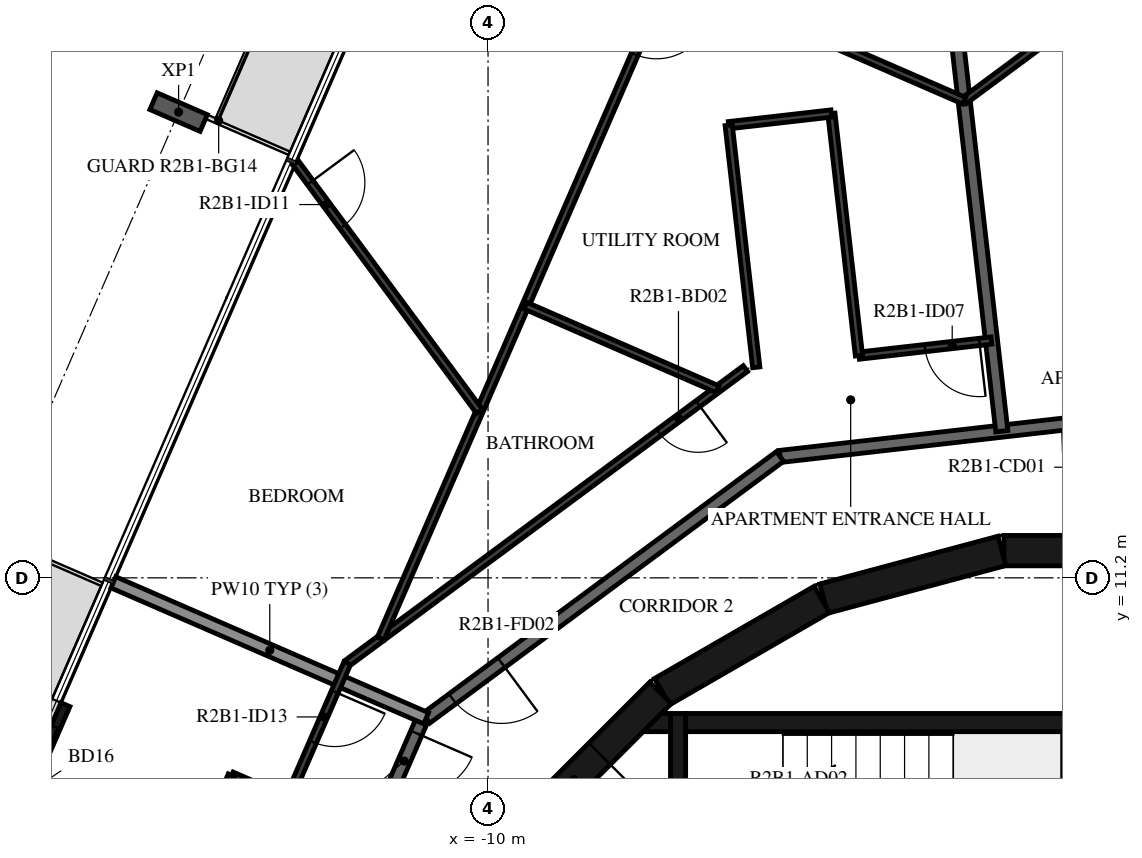
"""IFC4 building model, lengths in metres.
Left out: names, types, materials, properties, quantities, classifications, styles, units other than length and angle.
Written with IfcOpenShell. Run it as: python <this file> out.ifc"""

import sys

from ifc_helpers import new_model, si_unit, direction, frame, frame_2d, origin, origin_2d, place, context, subcontext, project, spatial, polyline, rectangle, i_section, outline, extrude, element, fill, save


model = new_model("IFC4")
c1 = context("Model", 3, precision=1e-05, world=origin(), true_north=direction((0.0, 1.0)))
c2 = subcontext(c1, "Body", "Model", "MODEL_VIEW")
j1 = project(units=[si_unit("LENGTHUNIT", "METRE"), si_unit("PLANEANGLEUNIT", "RADIAN")], contexts=[c1])
p1 = place(None, origin())
s1 = spatial("IfcSite", under=j1, at=p1, CompositionType="ELEMENT")
p2 = place(p1, origin())
s2 = spatial("IfcBuilding", under=s1, at=p2, CompositionType="ELEMENT")
p3 = place(p2, frame((0.0, 0.0, 87.2)))
s3 = spatial("IfcBuildingStorey", under=s2, at=p3, CompositionType="ELEMENT", Elevation=87.2)
p4 = place(p3, frame((-15.089, 18.859, -0.38), z_axis=(0.0, 0.0, 1.0), x_axis=(0.398749038162, 0.917060087761, 0.0)))
e1 = element("IfcColumn", 1, at=p4, inside=s3, PredefinedType="COLUMN", context=c2, shape_type="SweptSolid", body=[
    extrude(i_section(OverallWidth=0.3, OverallDepth=0.9, WebThickness=0.019, FlangeThickness=0.035, FilletRadius=0.03, at=origin_2d()), origin(), (0.0, 0.0, 1.0), 3.5),
])
p5 = place(p3, frame((-16.949, 9.114, 0.0), z_axis=(0.0, 0.0, 1.0), x_axis=(-0.398720531764, -0.917072482168, 0.0)))
e2 = element("IfcWall", 2, at=p5, inside=s3, PredefinedType="STANDARD", context=c2, shape_type="SweptSolid", body=[
    extrude(rectangle(XDim=3.2, YDim=0.16, at=frame_2d((1.6, 0.0))), origin(), (0.0, 0.0, 1.0), 3.12),
])
p6 = place(p5, frame((0.4, 0.0, 0.0)))
e3 = element("IfcOpeningElement", 3, at=p6, cuts=e2, PredefinedType="OPENING", context=c2, shape_type="SweptSolid", body=[
    extrude(rectangle(XDim=2.4, YDim=2.4, at=frame_2d((1.2, 1.2))), frame((0.0, 0.09, 0.0), z_axis=(0.0, -1.0, 0.0), x_axis=(1.0, 0.0, 0.0)), (0.0, 0.0, 1.0), 0.18),
])
for number, where, z_axis, x_axis in (
    (4, (1.516, 11.647, 0.0), (0.0, 0.0, 1.0), (-1.0, 0.0, 0.0)),
    (5, (-1.55, 11.643, 0.0), (0.0, 0.0, 1.0), (-0.966, -0.259, 0.0)),
    (6, (-4.51, 10.845, 0.0), (0.0, 0.0, 1.0), (-0.866, -0.5, 0.0)),
):
    element("IfcWall", number, at=place(p3, frame(where, z_axis=z_axis, x_axis=x_axis)), inside=s3, PredefinedType="SHEAR", context=c2, shape_type="SweptSolid", body=[
        extrude(rectangle(XDim=3.033, YDim=0.5, at=frame_2d((1.516, 0.0))), origin(), (0.0, 0.0, 1.0), 3.12),
    ])
p7 = place(p3, frame((-7.164, 9.308, 0.0), z_axis=(0.0, 0.0, 1.0), x_axis=(-0.707106781187, -0.707106781187, 0.0)))
e7 = element("IfcWall", 7, at=p7, inside=s3, PredefinedType="SHEAR", context=c2, shape_type="SweptSolid", body=[
    extrude(rectangle(XDim=3.032, YDim=0.5, at=frame_2d((1.516, 0.0))), origin(), (0.0, 0.0, 1.0), 3.12),
])
p8 = place(p7, frame((1.416, 0.0, 0.0)))
e8 = element("IfcOpeningElement", 8, at=p8, cuts=e7, PredefinedType="OPENING", context=c2, shape_type="SweptSolid", body=[
    extrude(rectangle(XDim=1.2, YDim=2.1, at=frame_2d((0.6, 1.05))), frame((0.0, 0.26, 0.0), z_axis=(0.0, -1.0, 0.0), x_axis=(1.0, 0.0, 0.0)), (0.0, 0.0, 1.0), 0.52),
])
p9 = place(p3, frame((-6.75, 8.82, 0.0), z_axis=(0.0, 0.0, 1.0), x_axis=(1.0, 0.0, 0.0)))
e9 = element("IfcWall", 9, at=p9, inside=s3, PredefinedType="SHEAR", context=c2, shape_type="SweptSolid", body=[
    extrude(rectangle(XDim=6.75, YDim=0.3, at=frame_2d((3.375, 0.0))), origin(), (0.0, 0.0, 1.0), 3.12),
])
p10 = place(p3, frame((-6.875, 8.97, 0.0), z_axis=(0.0, 0.0, 1.0), x_axis=(0.0, -1.0, 0.0)))
e10 = element("IfcWall", 10, at=p10, inside=s3, PredefinedType="SHEAR", context=c2, shape_type="SweptSolid", body=[
    extrude(rectangle(XDim=3.92, YDim=0.25, at=frame_2d((1.96, 0.0))), origin(), (0.0, 0.0, 1.0), 3.12),
])
p11 = place(p10, frame((1.61, 0.0, 0.0)))
e11 = element("IfcOpeningElement", 11, at=p11, cuts=e10, PredefinedType="OPENING", context=c2, shape_type="SweptSolid", body=[
    extrude(rectangle(XDim=1.2, YDim=2.1, at=frame_2d((0.6, 1.05))), frame((0.0, 0.135, 0.0), z_axis=(0.0, -1.0, 0.0), x_axis=(1.0, 0.0, 0.0)), (0.0, 0.0, 1.0), 0.27),
])
p12 = place(p3, origin())
e12 = element("IfcWall", 12, at=p12, inside=s3, PredefinedType="SHEAR", context=c2, shape_type="SweptSolid", body=[
    extrude(outline(polyline([(-7.148, 8.97), (-7.0, 8.97), (-7.0, 8.67), (-7.448, 8.67), (-7.148, 8.97)])), origin(), (0.0, 0.0, 1.0), 3.12),
])
p13 = place(p3, frame((2.096, 14.028, 0.0), z_axis=(0.0, 0.0, 1.0), x_axis=(-0.993569170114, -0.113226782163, 0.0)))
e13 = element("IfcWall", 13, at=p13, inside=s3, PredefinedType="STANDARD", context=c2, shape_type="SweptSolid", body=[
    extrude(rectangle(XDim=7.342, YDim=0.2, at=frame_2d((3.671, 0.0))), origin(), (0.0, 0.0, 1.0), 3.12),
])
p14 = place(p3, frame((-5.198, 13.196, 0.0), z_axis=(0.0, 0.0, 1.0), x_axis=(-0.803864151363, -0.594812933748, 0.0)))
e14 = element("IfcWall", 14, at=p14, inside=s3, PredefinedType="STANDARD", context=c2, shape_type="SweptSolid", body=[
    extrude(rectangle(XDim=7.24, YDim=0.2, at=frame_2d((3.62, 0.0))), origin(), (0.0, 0.0, 1.0), 3.12),
])
p15 = place(p14, frame((5.7, 0.0, 0.0)))
e15 = element("IfcOpeningElement", 15, at=p15, cuts=e14, PredefinedType="OPENING", context=c2, shape_type="SweptSolid", body=[
    extrude(rectangle(XDim=1.0, YDim=2.1, at=frame_2d((0.5, 1.05))), frame((0.0, 0.11, 0.0), z_axis=(0.0, -1.0, 0.0), x_axis=(1.0, 0.0, 0.0)), (0.0, 0.0, 1.0), 0.22),
])
p16 = place(p3, frame((-11.1, 8.829, 0.0), z_axis=(0.0, 0.0, 1.0), x_axis=(-0.398741918631, -0.917063183388, 0.0)))
e16 = element("IfcWall", 16, at=p16, inside=s3, PredefinedType="STANDARD", context=c2, shape_type="SweptSolid", body=[
    extrude(rectangle(XDim=7.342, YDim=0.2, at=frame_2d((3.671, 0.0))), origin(), (0.0, 0.0, 1.0), 3.12),
])
p17 = place(p16, frame((0.2, 0.0, 0.0)))
e17 = element("IfcOpeningElement", 17, at=p17, cuts=e16, PredefinedType="OPENING", context=c2, shape_type="SweptSolid", body=[
    extrude(rectangle(XDim=1.0, YDim=2.1, at=frame_2d((0.5, 1.05))), frame((0.0, 0.11, 0.0), z_axis=(0.0, -1.0, 0.0), x_axis=(1.0, 0.0, 0.0)), (0.0, 0.0, 1.0), 0.22),
])
p18 = place(p3, frame((-2.384, 20.92, 0.0), z_axis=(0.0, 0.0, 1.0), x_axis=(0.113210540889, -0.993571020829, 0.0)))
e18 = element("IfcWall", 18, at=p18, inside=s3, PredefinedType="STANDARD", context=c2, shape_type="SweptSolid", body=[
    extrude(rectangle(XDim=7.356, YDim=0.2, at=frame_2d((3.678, 0.0))), origin(), (0.0, 0.0, 1.0), 3.12),
])
p19 = place(p3, frame((-16.161, 11.126, 0.0), z_axis=(0.0, 0.0, 1.0), x_axis=(0.917063135481, -0.398742028813, 0.0)))
e19 = element("IfcWall", 19, at=p19, inside=s3, PredefinedType="STANDARD", context=c2, shape_type="SweptSolid", body=[
    extrude(rectangle(XDim=5.608, YDim=0.2, at=frame_2d((2.804, 0.0))), origin(), (0.0, 0.0, 1.0), 2.73),
])
p20 = place(p3, frame((2.068, 22.183, 0.0), z_axis=(0.0, 0.0, 1.0), x_axis=(-0.803867138365, -0.594808896921, 0.0)))
e20 = element("IfcWall", 20, at=p20, inside=s3, PredefinedType="PARTITIONING", context=c2, shape_type="SweptSolid", body=[
    extrude(rectangle(XDim=5.273, YDim=0.12, at=frame_2d((2.636, 0.0))), origin(), (0.0, 0.0, 1.0), 3.12),
])
p21 = place(p20, frame((0.2, 0.0, 0.0)))
e21 = element("IfcOpeningElement", 21, at=p21, cuts=e20, PredefinedType="OPENING", context=c2, shape_type="SweptSolid", body=[
    extrude(rectangle(XDim=0.9, YDim=2.1, at=frame_2d((0.45, 1.05))), frame((0.0, 0.07, 0.0), z_axis=(0.0, -1.0, 0.0), x_axis=(1.0, 0.0, 0.0)), (0.0, 0.0, 1.0), 0.14),
])
p22 = place(p3, frame((-1.721, 15.102, 0.0), z_axis=(0.0, 0.0, 1.0), x_axis=(-0.993571720958, -0.11320439617, 0.0)))
e22 = element("IfcWall", 22, at=p22, inside=s3, PredefinedType="PARTITIONING", context=c2, shape_type="SweptSolid", body=[
    extrude(rectangle(XDim=2.193, YDim=0.12, at=frame_2d((1.097, 0.0))), origin(), (0.0, 0.0, 1.0), 3.12),
])
p23 = place(p22, frame((0.2, 0.0, 0.0)))
e23 = element("IfcOpeningElement", 23, at=p23, cuts=e22, PredefinedType="OPENING", context=c2, shape_type="SweptSolid", body=[
    extrude(rectangle(XDim=0.9, YDim=2.1, at=frame_2d((0.45, 1.05))), frame((0.0, 0.07, 0.0), z_axis=(0.0, -1.0, 0.0), x_axis=(1.0, 0.0, 0.0)), (0.0, 0.0, 1.0), 0.14),
])
p24 = place(p3, frame((-3.9, 14.854, 0.0), z_axis=(0.0, 0.0, 1.0), x_axis=(-0.113178937308, 0.993574621329, 0.0)))
e24 = element("IfcWall", 24, at=p24, inside=s3, PredefinedType="PARTITIONING", context=c2, shape_type="SweptSolid", body=[
    extrude(rectangle(XDim=4.008, YDim=0.12, at=frame_2d((2.004, 0.0))), origin(), (0.0, 0.0, 1.0), 3.12),
])
p25 = place(p3, frame((-4.354, 18.836, 0.0), z_axis=(0.0, 0.0, 1.0), x_axis=(-0.99355903199, -0.113315709199, 0.0)))
e25 = element("IfcWall", 25, at=p25, inside=s3, PredefinedType="PARTITIONING", context=c2, shape_type="SweptSolid", body=[
    extrude(rectangle(XDim=1.7, YDim=0.12, at=frame_2d((0.85, 0.0))), origin(), (0.0, 0.0, 1.0), 3.12),
])
p26 = place(p3, frame((-6.042, 18.644, 0.0), z_axis=(0.0, 0.0, 1.0), x_axis=(0.113185787648, -0.993573840977, 0.0)))
e26 = element("IfcWall", 26, at=p26, inside=s3, PredefinedType="PARTITIONING", context=c2, shape_type="SweptSolid", body=[
    extrude(rectangle(XDim=4.008, YDim=0.12, at=frame_2d((2.004, 0.0))), origin(), (0.0, 0.0, 1.0), 3.12),
])
p27 = place(p3, frame((-5.767, 14.641, 0.0), z_axis=(0.0, 0.0, 1.0), x_axis=(-0.803853364238, -0.594827511807, 0.0)))
e27 = element("IfcWall", 27, at=p27, inside=s3, PredefinedType="PARTITIONING", context=c2, shape_type="SweptSolid", body=[
    extrude(rectangle(XDim=8.146, YDim=0.12, at=frame_2d((4.073, 0.0))), origin(), (0.0, 0.0, 1.0), 3.12),
])
p28 = place(p27, frame((0.97, 0.0, 0.0)))
e28 = element("IfcOpeningElement", 28, at=p28, cuts=e27, PredefinedType="OPENING", context=c2, shape_type="SweptSolid", body=[
    extrude(rectangle(XDim=0.8, YDim=2.1, at=frame_2d((0.4, 1.05))), frame((0.0, 0.07, 0.0), z_axis=(0.0, -1.0, 0.0), x_axis=(1.0, 0.0, 0.0)), (0.0, 0.0, 1.0), 0.14),
])
p29 = place(p3, frame((-12.315, 9.796, 0.0), z_axis=(0.0, 0.0, 1.0), x_axis=(-0.398762563957, -0.91705420646, 0.0)))
e29 = element("IfcWall", 29, at=p29, inside=s3, PredefinedType="PARTITIONING", context=c2, shape_type="SweptSolid", body=[
    extrude(rectangle(XDim=2.449, YDim=0.12, at=frame_2d((1.225, 0.0))), origin(), (0.0, 0.0, 1.0), 3.12),
])
p30 = place(p29, frame((0.513, 0.0, 0.0)))
e30 = element("IfcOpeningElement", 30, at=p30, cuts=e29, PredefinedType="OPENING", context=c2, shape_type="SweptSolid", body=[
    extrude(rectangle(XDim=0.9, YDim=2.1, at=frame_2d((0.45, 1.05))), frame((0.0, 0.07, 0.0), z_axis=(0.0, -1.0, 0.0), x_axis=(1.0, 0.0, 0.0)), (0.0, 0.0, 1.0), 0.14),
])
p31 = place(p3, frame((-7.005, 21.149, 0.0), z_axis=(0.0, 0.0, 1.0), x_axis=(0.917050915224, -0.398770132891, 0.0)))
e31 = element("IfcWall", 31, at=p31, inside=s3, PredefinedType="PARTITIONING", context=c2, shape_type="SweptSolid", body=[
    extrude(rectangle(XDim=5.272, YDim=0.12, at=frame_2d((2.636, 0.0))), origin(), (0.0, 0.0, 1.0), 3.12),
])
p32 = place(p31, frame((0.2, 0.0, 0.0)))
e32 = element("IfcOpeningElement", 32, at=p32, cuts=e31, PredefinedType="OPENING", context=c2, shape_type="SweptSolid", body=[
    extrude(rectangle(XDim=0.9, YDim=2.1, at=frame_2d((0.45, 1.05))), frame((0.0, 0.07, 0.0), z_axis=(0.0, -1.0, 0.0), x_axis=(1.0, 0.0, 0.0)), (0.0, 0.0, 1.0), 0.14),
])
p33 = place(p3, frame((-5.952, 23.571, 0.0), z_axis=(0.0, 0.0, 1.0), x_axis=(-0.398745097158, -0.917061801348, 0.0)))
e33 = element("IfcWall", 33, at=p33, inside=s3, PredefinedType="PARTITIONING", context=c2, shape_type="SweptSolid", body=[
    extrude(rectangle(XDim=14.576, YDim=0.12, at=frame_2d((7.288, 0.0))), origin(), (0.0, 0.0, 1.0), 3.12),
])
p34 = place(p33, frame((3.201, 0.0, 0.0)))
e34 = element("IfcOpeningElement", 34, at=p34, cuts=e33, PredefinedType="OPENING", context=c2, shape_type="SweptSolid", body=[
    extrude(rectangle(XDim=0.9, YDim=2.1, at=frame_2d((0.45, 1.05))), frame((0.0, 0.07, 0.0), z_axis=(0.0, -1.0, 0.0), x_axis=(1.0, 0.0, 0.0)), (0.0, 0.0, 1.0), 0.14),
])
p35 = place(p33, frame((0.2, 0.0, 0.0)))
e35 = element("IfcOpeningElement", 35, at=p35, cuts=e33, PredefinedType="OPENING", context=c2, shape_type="SweptSolid", body=[
    extrude(rectangle(XDim=0.9, YDim=2.1, at=frame_2d((0.45, 1.05))), frame((0.0, 0.07, 0.0), z_axis=(0.0, -1.0, 0.0), x_axis=(1.0, 0.0, 0.0)), (0.0, 0.0, 1.0), 0.14),
])
p36 = place(p3, frame((-9.385, 15.676, 0.0), z_axis=(0.0, 0.0, 1.0), x_axis=(0.917068929701, -0.398728702475, 0.0)))
e36 = element("IfcWall", 36, at=p36, inside=s3, PredefinedType="PARTITIONING", context=c2, shape_type="SweptSolid", body=[
    extrude(rectangle(XDim=3.445, YDim=0.12, at=frame_2d((1.723, 0.0))), origin(), (0.0, 0.0, 1.0), 3.12),
])
p37 = place(p3, frame((-13.163, 18.022, 0.0), z_axis=(0.0, 0.0, 1.0), x_axis=(0.594797671626, -0.803875444226, 0.0)))
e37 = element("IfcWall", 37, at=p37, inside=s3, PredefinedType="PARTITIONING", context=c2, shape_type="SweptSolid", body=[
    extrude(rectangle(XDim=5.081, YDim=0.12, at=frame_2d((2.54, 0.0))), origin(), (0.0, 0.0, 1.0), 3.12),
])
p38 = place(p37, frame((0.4, 0.0, 0.0)))
e38 = element("IfcOpeningElement", 38, at=p38, cuts=e37, PredefinedType="OPENING", context=c2, shape_type="SweptSolid", body=[
    extrude(rectangle(XDim=0.9, YDim=2.1, at=frame_2d((0.45, 1.05))), frame((0.0, 0.07, 0.0), z_axis=(0.0, -1.0, 0.0), x_axis=(1.0, 0.0, 0.0)), (0.0, 0.0, 1.0), 0.14),
])
p39 = place(p3, frame((-13.292, 7.55, 0.0), z_axis=(0.0, 0.0, 1.0), x_axis=(-0.917016180017, 0.398850003871, 0.0)))
e39 = element("IfcWall", 39, at=p39, inside=s3, PredefinedType="PARTITIONING", context=c2, shape_type="SweptSolid", body=[
    extrude(rectangle(XDim=1.009, YDim=0.12, at=frame_2d((0.504, 0.0))), origin(), (0.0, 0.0, 1.0), 3.12),
])
p40 = place(p3, frame((-14.217, 7.952, 0.0), z_axis=(0.0, 0.0, 1.0), x_axis=(-0.398722053614, -0.917071820503, 0.0)))
e40 = element("IfcWall", 40, at=p40, inside=s3, PredefinedType="PARTITIONING", context=c2, shape_type="SweptSolid", body=[
    extrude(rectangle(XDim=4.4, YDim=0.12, at=frame_2d((2.2, 0.0))), origin(), (0.0, 0.0, 1.0), 3.12),
])
p41 = place(p6, origin())
e41 = element("IfcDoor", 41, at=p41, inside=s3, OperationType="DOUBLE_DOOR_SLIDING", PredefinedType="DOOR", context=c2, shape_type="SweptSolid", body=[
    extrude(rectangle(XDim=2.4, YDim=2.4, at=frame_2d((1.2, 1.2))), frame((0.0, 0.025, 0.0), z_axis=(0.0, -1.0, 0.0), x_axis=(1.0, 0.0, 0.0)), (0.0, 0.0, 1.0), 0.05),
])
fill(e3, e41)
p42 = place(p8, origin())
e42 = element("IfcDoor", 42, at=p42, inside=s3, OperationType="SINGLE_SWING_RIGHT", PredefinedType="DOOR", context=c2, shape_type="SweptSolid", body=[
    extrude(rectangle(XDim=1.2, YDim=2.1, at=frame_2d((0.6, 1.05))), frame((0.0, 0.025, 0.0), z_axis=(0.0, -1.0, 0.0), x_axis=(1.0, 0.0, 0.0)), (0.0, 0.0, 1.0), 0.05),
])
fill(e8, e42)
p43 = place(p15, origin())
e43 = element("IfcDoor", 43, at=p43, inside=s3, OperationType="SINGLE_SWING_LEFT", PredefinedType="DOOR", context=c2, shape_type="SweptSolid", body=[
    extrude(rectangle(XDim=1.0, YDim=2.1, at=frame_2d((0.5, 1.05))), frame((0.0, 0.025, 0.0), z_axis=(0.0, -1.0, 0.0), x_axis=(1.0, 0.0, 0.0)), (0.0, 0.0, 1.0), 0.05),
])
fill(e15, e43)
p44 = place(p23, origin())
e44 = element("IfcDoor", 44, at=p44, inside=s3, OperationType="SINGLE_SWING_LEFT", PredefinedType="DOOR", context=c2, shape_type="SweptSolid", body=[
    extrude(rectangle(XDim=0.9, YDim=2.1, at=frame_2d((0.45, 1.05))), frame((0.0, 0.025, 0.0), z_axis=(0.0, -1.0, 0.0), x_axis=(1.0, 0.0, 0.0)), (0.0, 0.0, 1.0), 0.05),
])
fill(e23, e44)
p45 = place(p28, origin())
e45 = element("IfcDoor", 45, at=p45, inside=s3, OperationType="SINGLE_SWING_LEFT", PredefinedType="DOOR", context=c2, shape_type="SweptSolid", body=[
    extrude(rectangle(XDim=0.8, YDim=2.1, at=frame_2d((0.4, 1.05))), frame((0.0, 0.025, 0.0), z_axis=(0.0, -1.0, 0.0), x_axis=(1.0, 0.0, 0.0)), (0.0, 0.0, 1.0), 0.05),
])
fill(e28, e45)
p46 = place(p34, origin())
e46 = element("IfcDoor", 46, at=p46, inside=s3, OperationType="SINGLE_SWING_LEFT", PredefinedType="DOOR", context=c2, shape_type="SweptSolid", body=[
    extrude(rectangle(XDim=0.9, YDim=2.1, at=frame_2d((0.45, 1.05))), frame((0.0, 0.025, 0.0), z_axis=(0.0, -1.0, 0.0), x_axis=(1.0, 0.0, 0.0)), (0.0, 0.0, 1.0), 0.05),
])
fill(e34, e46)
p47 = place(p38, origin())
e47 = element("IfcDoor", 47, at=p47, inside=s3, OperationType="SINGLE_SWING_RIGHT", PredefinedType="DOOR", context=c2, shape_type="SweptSolid", body=[
    extrude(rectangle(XDim=0.9, YDim=2.1, at=frame_2d((0.45, 1.05))), frame((0.0, 0.025, 0.0), z_axis=(0.0, -1.0, 0.0), x_axis=(1.0, 0.0, 0.0)), (0.0, 0.0, 1.0), 0.05),
])
fill(e38, e47)
p48 = place(p17, origin())
e48 = element("IfcDoor", 48, at=p48, inside=s3, OperationType="SINGLE_SWING_LEFT", PredefinedType="DOOR", context=c2, shape_type="SweptSolid", body=[
    extrude(rectangle(XDim=1.0, YDim=2.1, at=frame_2d((0.5, 1.05))), frame((0.0, 0.025, 0.0), z_axis=(0.0, -1.0, 0.0), x_axis=(1.0, 0.0, 0.0)), (0.0, 0.0, 1.0), 0.05),
])
fill(e17, e48)
p49 = place(p30, origin())
e49 = element("IfcDoor", 49, at=p49, inside=s3, OperationType="SINGLE_SWING_LEFT", PredefinedType="DOOR", context=c2, shape_type="SweptSolid", body=[
    extrude(rectangle(XDim=0.9, YDim=2.1, at=frame_2d((0.45, 1.05))), frame((0.0, 0.025, 0.0), z_axis=(0.0, -1.0, 0.0), x_axis=(1.0, 0.0, 0.0)), (0.0, 0.0, 1.0), 0.05),
])
fill(e30, e49)
save(model, sys.argv[1])
